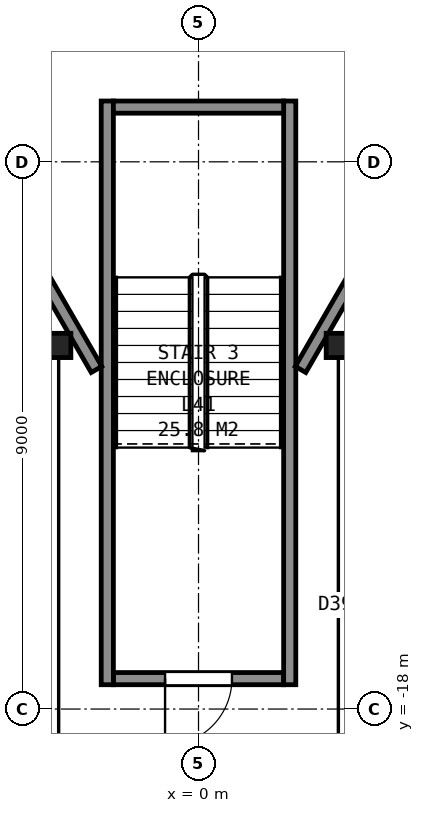
"""IFC4 building model, lengths in metres.
Left out: names, types, materials, properties, quantities, classifications, styles, units other than length and angle.
Written with IfcOpenShell. Run it as: python <this file> out.ifc"""

import sys

from ifc_helpers import new_model, si_unit, direction, frame, frame_2d, origin, origin_2d, place, context, subcontext, project, spatial, rectangle, i_section, extrude, element, fill, save


model = new_model("IFC4")
c1 = context("Model", 3, precision=1e-05, world=origin(), true_north=direction((0.0, 1.0)))
c2 = subcontext(c1, "Body", "Model", "MODEL_VIEW")
j1 = project(units=[si_unit("LENGTHUNIT", "METRE"), si_unit("PLANEANGLEUNIT", "RADIAN")], contexts=[c1])
p1 = place(None, origin())
s1 = spatial("IfcSite", under=j1, at=p1, CompositionType="ELEMENT")
p2 = place(p1, origin())
s2 = spatial("IfcBuilding", under=s1, at=p2, CompositionType="ELEMENT")
p3 = place(p2, frame((0.0, 0.0, 167.3)))
s3 = spatial("IfcBuildingStorey", under=s2, at=p3, CompositionType="ELEMENT", Elevation=167.3)
for number, where, z_axis, x_axis in (
    (1, (-2.3, -12.02, 0.0), (0.0, 0.0, 1.0), (1.0, 0.0, 0.0)),
    (2, (2.3, -12.02, 0.0), (0.0, 0.0, 1.0), (1.0, 0.0, 0.0)),
):
    element("IfcColumn", number, at=place(p3, frame(where, z_axis=z_axis, x_axis=x_axis)), inside=s3, PredefinedType="COLUMN", context=c2, shape_type="SweptSolid", body=[
        extrude(i_section(OverallWidth=0.401, OverallDepth=0.399, WebThickness=0.025, FlangeThickness=0.04, FilletRadius=0.015, at=origin_2d()), origin(), (0.0, 0.0, 1.0), 3.7),
    ])
p4 = place(p3, frame((-1.4, -17.5, 0.0), z_axis=(0.0, 0.0, 1.0), x_axis=(1.0, 0.0, 0.0)))
e3 = element("IfcWall", 3, at=p4, inside=s3, PredefinedType="PARTITIONING", context=c2, shape_type="SweptSolid", body=[
    extrude(rectangle(XDim=2.8, YDim=0.2, at=frame_2d((1.4, 0.0))), origin(), (0.0, 0.0, 1.0), 3.45),
])
p5 = place(p4, frame((0.85, 0.0, 0.0)))
e4 = element("IfcOpeningElement", 4, at=p5, cuts=e3, PredefinedType="OPENING", context=c2, shape_type="SweptSolid", body=[
    extrude(rectangle(XDim=1.1, YDim=2.1, at=frame_2d((0.55, 1.05))), frame((0.0, 0.11, 0.0), z_axis=(0.0, -1.0, 0.0), x_axis=(1.0, 0.0, 0.0)), (0.0, 0.0, 1.0), 0.22),
])
for number, where, z_axis, x_axis in (
    (5, (1.5, -8.0, 0.0), (0.0, 0.0, 1.0), (0.0, -1.0, 0.0)),
    (6, (-1.5, -8.0, 0.0), (0.0, 0.0, 1.0), (0.0, -1.0, 0.0)),
):
    element("IfcWall", number, at=place(p3, frame(where, z_axis=z_axis, x_axis=x_axis)), inside=s3, PredefinedType="PARTITIONING", context=c2, shape_type="SweptSolid", body=[
        extrude(rectangle(XDim=9.6, YDim=0.2, at=frame_2d((4.8, 0.0))), origin(), (0.0, 0.0, 1.0), 3.45),
    ])
p6 = place(p3, frame((-1.4, -8.1, 0.0), z_axis=(0.0, 0.0, 1.0), x_axis=(1.0, 0.0, 0.0)))
e7 = element("IfcWall", 7, at=p6, inside=s3, PredefinedType="PARTITIONING", context=c2, shape_type="SweptSolid", body=[
    extrude(rectangle(XDim=2.8, YDim=0.2, at=frame_2d((1.4, 0.0))), origin(), (0.0, 0.0, 1.0), 3.45),
])
p7 = place(p3, frame((-4.655, -7.257, 0.0), z_axis=(0.0, 0.0, 1.0), x_axis=(0.499966124405, -0.866044960985, 0.0)))
e8 = element("IfcWall", 8, at=p7, inside=s3, PredefinedType="PARTITIONING", context=c2, shape_type="SweptSolid", body=[
    extrude(rectangle(XDim=5.956, YDim=0.2, at=frame_2d((2.978, 0.0))), origin(), (0.0, 0.0, 1.0), 3.45),
])
p8 = place(p3, frame((1.677, -12.415, 0.0), z_axis=(0.0, 0.0, 1.0), x_axis=(0.500054337157, 0.865994029939, 0.0)))
e9 = element("IfcWall", 9, at=p8, inside=s3, PredefinedType="PARTITIONING", context=c2, shape_type="SweptSolid", body=[
    extrude(rectangle(XDim=6.177, YDim=0.2, at=frame_2d((3.088, 0.0))), origin(), (0.0, 0.0, 1.0), 3.45),
])
p9 = place(p8, frame((3.695, 0.0, 0.0)))
e10 = element("IfcOpeningElement", 10, at=p9, cuts=e9, PredefinedType="OPENING", context=c2, shape_type="SweptSolid", body=[
    extrude(rectangle(XDim=1.8, YDim=2.1, at=frame_2d((0.9, 1.05))), frame((0.0, 0.11, 0.0), z_axis=(0.0, -1.0, 0.0), x_axis=(1.0, 0.0, 0.0)), (0.0, 0.0, 1.0), 0.22),
])
p10 = place(p5, origin())
e11 = element("IfcDoor", 11, at=p10, inside=s3, OperationType="SINGLE_SWING_LEFT", PredefinedType="DOOR", context=c2, shape_type="SweptSolid", body=[
    extrude(rectangle(XDim=1.1, YDim=2.1, at=frame_2d((0.55, 1.05))), frame((0.0, 0.025, 0.0), z_axis=(0.0, -1.0, 0.0), x_axis=(1.0, 0.0, 0.0)), (0.0, 0.0, 1.0), 0.05),
])
fill(e4, e11)
save(model, sys.argv[1])
